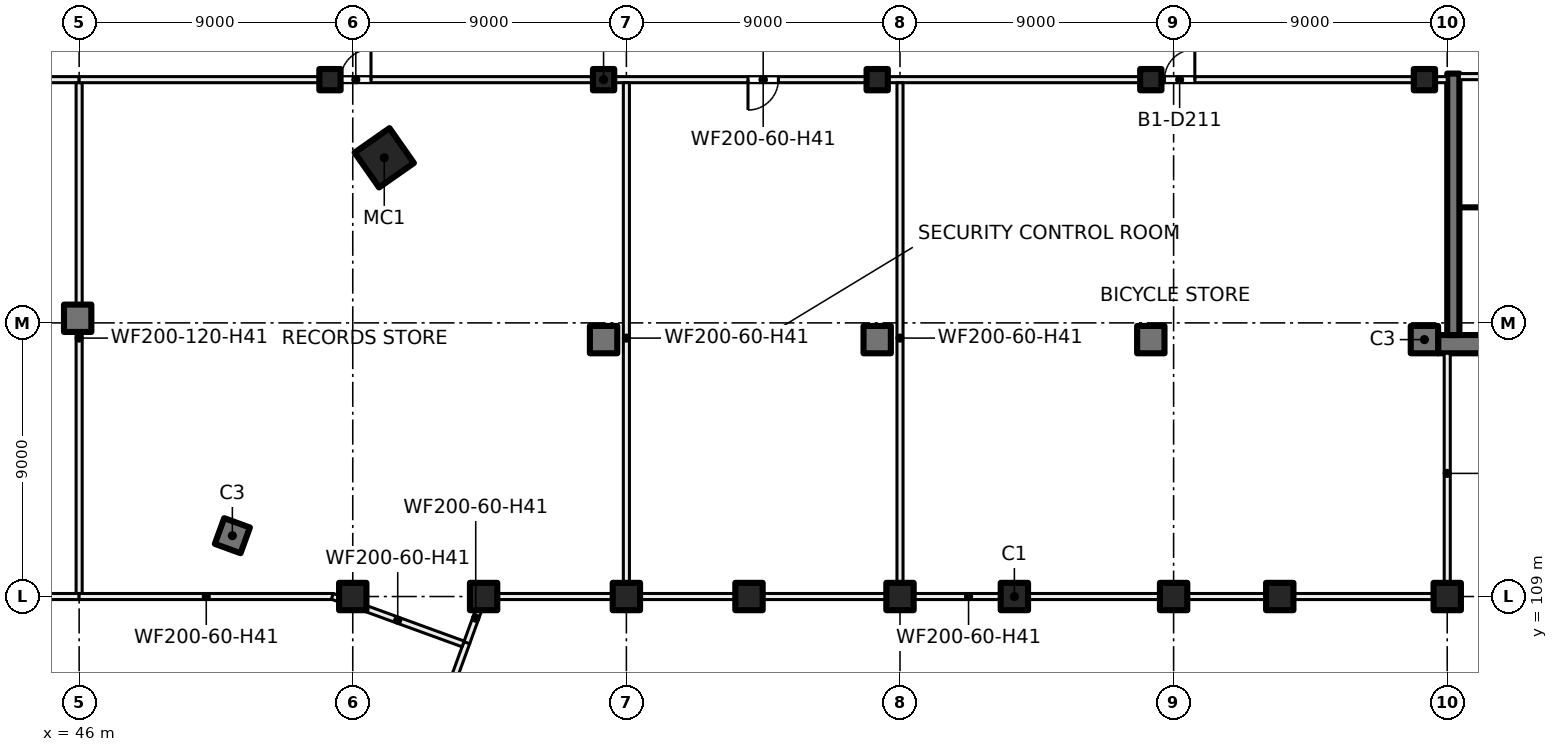
"""IFC4 building model, lengths in metres.
Left out: names, types, materials, properties, quantities, classifications, styles, units other than length and angle.
Written with IfcOpenShell. Run it as: python <this file> out.ifc"""

import sys

from ifc_helpers import new_model, si_unit, direction, frame, frame_2d, origin, origin_2d, place, context, subcontext, project, spatial, rectangle, hollow_rectangle, extrude, element, fill, save


model = new_model("IFC4")
c1 = context("Model", 3, precision=1e-05, world=origin(), true_north=direction((0.0, 1.0)))
c2 = subcontext(c1, "Body", "Model", "MODEL_VIEW")
j1 = project(units=[si_unit("LENGTHUNIT", "METRE"), si_unit("PLANEANGLEUNIT", "RADIAN")], contexts=[c1])
p1 = place(None, origin())
s1 = spatial("IfcSite", under=j1, at=p1, CompositionType="ELEMENT")
p2 = place(p1, origin())
s2 = spatial("IfcBuilding", under=s1, at=p2, CompositionType="ELEMENT")
p3 = place(p2, frame((0.0, 0.0, -4.5)))
s3 = spatial("IfcBuildingStorey", under=s2, at=p3, CompositionType="ELEMENT", Elevation=-4.5)
for number, where, z_axis, x_axis in (
    (1, (55.0, 109.0, 0.0), (0.0, 0.0, 1.0), (1.0, 0.0, 0.0)),
    (2, (64.0, 109.0, 0.0), (0.0, 0.0, 1.0), (1.0, 0.0, 0.0)),
    (3, (73.0, 109.0, 0.0), (0.0, 0.0, 1.0), (1.0, 0.0, 0.0)),
    (4, (82.0, 109.0, 0.0), (0.0, 0.0, 1.0), (1.0, 0.0, 0.0)),
    (5, (91.0, 109.0, 0.0), (0.0, 0.0, 1.0), (1.0, 0.0, 0.0)),
    (6, (59.304, 109.0, 0.0), (0.0, 0.0, 1.0), (1.0, 0.0, 0.0)),
    (7, (68.033, 109.0, 0.0), (0.0, 0.0, 1.0), (1.0, 0.0, 0.0)),
    (8, (76.762, 109.0, 0.0), (0.0, 0.0, 1.0), (1.0, 0.0, 0.0)),
    (9, (85.491, 109.0, 0.0), (0.0, 0.0, 1.0), (1.0, 0.0, 0.0)),
):
    element("IfcColumn", number, at=place(p3, frame(where, z_axis=z_axis, x_axis=x_axis)), inside=s3, PredefinedType="COLUMN", context=c2, shape_type="SweptSolid", body=[
        extrude(rectangle(XDim=0.9, YDim=0.9, at=origin_2d()), origin(), (0.0, 0.0, 1.0), 4.5),
    ])
p4 = place(p3, frame((56.036, 123.43, 0.0), z_axis=(0.0, 0.0, 1.0), x_axis=(0.573576436351, -0.819152044289, 0.0)))
e10 = element("IfcColumn", 10, at=p4, inside=s3, PredefinedType="COLUMN", context=c2, shape_type="SweptSolid", body=[
    extrude(hollow_rectangle(XDim=1.4, YDim=1.4, WallThickness=0.04, at=origin_2d()), origin(), (0.0, 0.0, 1.0), 4.5),
])
for number, where, z_axis, x_axis in (
    (11, (54.25, 126.0, 0.0), (0.0, 0.0, 1.0), (1.0, 0.0, 0.0)),
    (12, (63.25, 126.0, 0.0), (0.0, 0.0, 1.0), (1.0, 0.0, 0.0)),
    (13, (72.25, 126.0, 0.0), (0.0, 0.0, 1.0), (1.0, 0.0, 0.0)),
    (14, (81.25, 126.0, 0.0), (0.0, 0.0, 1.0), (1.0, 0.0, 0.0)),
    (15, (90.25, 126.0, 0.0), (0.0, 0.0, 1.0), (1.0, 0.0, 0.0)),
):
    element("IfcColumn", number, at=place(p3, frame(where, z_axis=z_axis, x_axis=x_axis)), inside=s3, PredefinedType="COLUMN", context=c2, shape_type="SweptSolid", body=[
        extrude(rectangle(XDim=0.7, YDim=0.7, at=origin_2d()), origin(), (0.0, 0.0, 1.0), 4.5),
    ])
for number, where, z_axis, x_axis in (
    (16, (45.952, 118.152, 0.0), (0.0, 0.0, 1.0), (1.0, 0.0, 0.0)),
    (17, (63.25, 117.45, 0.0), (0.0, 0.0, 1.0), (1.0, 0.0, 0.0)),
    (18, (72.25, 117.45, 0.0), (0.0, 0.0, 1.0), (1.0, 0.0, 0.0)),
    (19, (81.25, 117.45, 0.0), (0.0, 0.0, 1.0), (1.0, 0.0, 0.0)),
    (20, (90.25, 117.45, 0.0), (0.0, 0.0, 1.0), (1.0, 0.0, 0.0)),
    (21, (51.04, 111.001, 0.0), (0.0, 0.0, 1.0), (-0.342, -0.94, 0.0)),
):
    element("IfcColumn", number, at=place(p3, frame(where, z_axis=z_axis, x_axis=x_axis)), inside=s3, PredefinedType="COLUMN", context=c2, shape_type="SweptSolid", body=[
        extrude(rectangle(XDim=0.9, YDim=0.9, at=origin_2d()), origin(), (0.0, 0.0, 1.0), 4.5),
    ])
p5 = place(p3, frame((99.6, 117.3, 0.0), z_axis=(0.0, 0.0, 1.0), x_axis=(-1.0, 0.0, 0.0)))
e22 = element("IfcWall", 22, at=p5, inside=s3, PredefinedType="SHEAR", context=c2, shape_type="SweptSolid", body=[
    extrude(rectangle(XDim=8.9, YDim=0.6, at=frame_2d((4.45, 0.0))), origin(), (0.0, 0.0, 1.0), 4.5),
])
p6 = place(p3, frame((91.2, 126.2, 0.0), z_axis=(0.0, 0.0, 1.0), x_axis=(0.0, -1.0, 0.0)))
e23 = element("IfcWall", 23, at=p6, inside=s3, PredefinedType="SHEAR", context=c2, shape_type="SweptSolid", body=[
    extrude(rectangle(XDim=8.6, YDim=0.4, at=frame_2d((4.3, 0.0))), origin(), (0.0, 0.0, 1.0), 4.5),
])
p7 = place(p3, frame((95.2, 126.1, 0.0), z_axis=(0.0, 0.0, 1.0), x_axis=(-1.0, 0.0, 0.0)))
e24 = element("IfcWall", 24, at=p7, inside=s3, PredefinedType="PARTITIONING", context=c2, shape_type="SweptSolid", body=[
    extrude(rectangle(XDim=3.8, YDim=0.2, at=frame_2d((1.9, 0.0))), origin(), (0.0, 0.0, 1.0), 4.1),
])
p8 = place(p7, frame((0.3, 0.0, 0.0)))
e25 = element("IfcOpeningElement", 25, at=p8, cuts=e24, PredefinedType="OPENING", context=c2, shape_type="SweptSolid", body=[
    extrude(rectangle(XDim=1.2, YDim=2.1, at=frame_2d((0.6, 1.05))), frame((0.0, 0.11, 0.0), z_axis=(0.0, -1.0, 0.0), x_axis=(1.0, 0.0, 0.0)), (0.0, 0.0, 1.0), 0.22),
])
p9 = place(p3, frame((93.35, 121.8, 0.0), z_axis=(0.0, 0.0, 1.0), x_axis=(-1.0, 0.0, 0.0)))
e26 = element("IfcWall", 26, at=p9, inside=s3, PredefinedType="PARTITIONING", context=c2, shape_type="SweptSolid", body=[
    extrude(rectangle(XDim=1.95, YDim=0.1, at=frame_2d((0.975, 0.0))), origin(), (0.0, 0.0, 1.0), 4.1),
])
p10 = place(p3, frame((46.0, 126.0, 0.0), z_axis=(0.0, 0.0, 1.0), x_axis=(-1.0, 0.0, 0.0)))
e27 = element("IfcWall", 27, at=p10, inside=s3, PredefinedType="PARTITIONING", context=c2, shape_type="SweptSolid", body=[
    extrude(rectangle(XDim=17.9, YDim=0.2, at=frame_2d((8.95, 0.0))), origin(), (0.0, 0.0, 1.0), 4.1),
])
p11 = place(p10, frame((5.498, 0.0, 0.0)))
e28 = element("IfcOpeningElement", 28, at=p11, cuts=e27, PredefinedType="OPENING", context=c2, shape_type="SweptSolid", body=[
    extrude(rectangle(XDim=1.0, YDim=2.1, at=frame_2d((0.5, 1.05))), frame((0.0, 0.11, 0.0), z_axis=(0.0, -1.0, 0.0), x_axis=(1.0, 0.0, 0.0)), (0.0, 0.0, 1.0), 0.22),
])
p12 = place(p3, frame((37.062, 109.0, 0.0), z_axis=(0.0, 0.0, 1.0), x_axis=(1.0, 0.0, 0.0)))
e29 = element("IfcWall", 29, at=p12, inside=s3, PredefinedType="PARTITIONING", context=c2, shape_type="SweptSolid", body=[
    extrude(rectangle(XDim=8.938, YDim=0.2, at=frame_2d((4.469, 0.0))), origin(), (0.0, 0.0, 1.0), 4.1),
])
p13 = place(p3, frame((46.0, 109.1, 0.0), z_axis=(0.0, 0.0, 1.0), x_axis=(0.0, 1.0, 0.0)))
e30 = element("IfcWall", 30, at=p13, inside=s3, PredefinedType="PARTITIONING", context=c2, shape_type="SweptSolid", body=[
    extrude(rectangle(XDim=16.8, YDim=0.2, at=frame_2d((8.4, 0.0))), origin(), (0.0, 0.0, 1.0), 4.1),
])
p14 = place(p3, frame((46.0, 109.0, 0.0), z_axis=(0.0, 0.0, 1.0), x_axis=(1.0, 0.0, 0.0)))
e31 = element("IfcWall", 31, at=p14, inside=s3, PredefinedType="PARTITIONING", context=c2, shape_type="SweptSolid", body=[
    extrude(rectangle(XDim=8.363, YDim=0.2, at=frame_2d((4.182, 0.0))), origin(), (0.0, 0.0, 1.0), 4.1),
])
p15 = place(p3, frame((91.0, 126.0, 0.0), z_axis=(0.0, 0.0, 1.0), x_axis=(-1.0, 0.0, 0.0)))
e32 = element("IfcWall", 32, at=p15, inside=s3, PredefinedType="PARTITIONING", context=c2, shape_type="SweptSolid", body=[
    extrude(rectangle(XDim=45.0, YDim=0.2, at=frame_2d((22.5, 0.0))), origin(), (0.0, 0.0, 1.0), 4.1),
])
p16 = place(p15, frame((35.4, 0.0, 0.0)))
e33 = element("IfcOpeningElement", 33, at=p16, cuts=e32, PredefinedType="OPENING", context=c2, shape_type="SweptSolid", body=[
    extrude(rectangle(XDim=1.0, YDim=2.1, at=frame_2d((0.5, 1.05))), frame((0.0, 0.11, 0.0), z_axis=(0.0, -1.0, 0.0), x_axis=(1.0, 0.0, 0.0)), (0.0, 0.0, 1.0), 0.22),
])
p17 = place(p15, frame((22.0, 0.0, 0.0)))
e34 = element("IfcOpeningElement", 34, at=p17, cuts=e32, PredefinedType="OPENING", context=c2, shape_type="SweptSolid", body=[
    extrude(rectangle(XDim=1.0, YDim=2.1, at=frame_2d((0.5, 1.05))), frame((0.0, 0.11, 0.0), z_axis=(0.0, -1.0, 0.0), x_axis=(1.0, 0.0, 0.0)), (0.0, 0.0, 1.0), 0.22),
])
p18 = place(p15, frame((8.302, 0.0, 0.0)))
e35 = element("IfcOpeningElement", 35, at=p18, cuts=e32, PredefinedType="OPENING", context=c2, shape_type="SweptSolid", body=[
    extrude(rectangle(XDim=1.0, YDim=2.1, at=frame_2d((0.5, 1.05))), frame((0.0, 0.11, 0.0), z_axis=(0.0, -1.0, 0.0), x_axis=(1.0, 0.0, 0.0)), (0.0, 0.0, 1.0), 0.22),
])
p19 = place(p3, frame((54.0, 94.429, 0.0), z_axis=(0.0, 0.0, 1.0), x_axis=(0.342057301943, 0.939679095323, 0.0)))
e36 = element("IfcWall", 36, at=p19, inside=s3, PredefinedType="PARTITIONING", context=c2, shape_type="SweptSolid", body=[
    extrude(rectangle(XDim=13.91, YDim=0.2, at=frame_2d((6.955, 0.0))), origin(), (0.0, 0.0, 1.0), 4.1),
])
p20 = place(p3, frame((54.328, 109.006, 0.0), z_axis=(0.0, 0.0, 1.0), x_axis=(0.939667244136, -0.342089857053, 0.0)))
e37 = element("IfcWall", 37, at=p20, inside=s3, PredefinedType="PARTITIONING", context=c2, shape_type="SweptSolid", body=[
    extrude(rectangle(XDim=4.578, YDim=0.2, at=frame_2d((2.289, 0.0))), origin(), (0.0, 0.0, 1.0), 4.1),
])
p21 = place(p3, frame((58.751, 107.481, 0.0), z_axis=(0.0, 0.0, 1.0), x_axis=(0.341925778056, 0.93972696157, 0.0)))
e38 = element("IfcWall", 38, at=p21, inside=s3, PredefinedType="PARTITIONING", context=c2, shape_type="SweptSolid", body=[
    extrude(rectangle(XDim=1.717, YDim=0.2, at=frame_2d((0.858, 0.0))), origin(), (0.0, 0.0, 1.0), 4.1),
])
p22 = place(p3, frame((59.41, 109.0, 0.0), z_axis=(0.0, 0.0, 1.0), x_axis=(1.0, 0.0, 0.0)))
e39 = element("IfcWall", 39, at=p22, inside=s3, PredefinedType="PARTITIONING", context=c2, shape_type="SweptSolid", body=[
    extrude(rectangle(XDim=31.69, YDim=0.2, at=frame_2d((15.845, 0.0))), origin(), (0.0, 0.0, 1.0), 4.1),
])
for number, where, z_axis, x_axis in (
    (40, (64.0, 109.1, 0.0), (0.0, 0.0, 1.0), (0.0, 1.0, 0.0)),
    (41, (73.0, 109.1, 0.0), (0.0, 0.0, 1.0), (0.0, 1.0, 0.0)),
):
    element("IfcWall", number, at=place(p3, frame(where, z_axis=z_axis, x_axis=x_axis)), inside=s3, PredefinedType="PARTITIONING", context=c2, shape_type="SweptSolid", body=[
        extrude(rectangle(XDim=16.8, YDim=0.2, at=frame_2d((8.4, 0.0))), origin(), (0.0, 0.0, 1.0), 4.1),
    ])
p23 = place(p3, frame((91.0, 109.1, 0.0), z_axis=(0.0, 0.0, 1.0), x_axis=(0.0, 1.0, 0.0)))
e42 = element("IfcWall", 42, at=p23, inside=s3, PredefinedType="PARTITIONING", context=c2, shape_type="SweptSolid", body=[
    extrude(rectangle(XDim=7.9, YDim=0.2, at=frame_2d((3.95, 0.0))), origin(), (0.0, 0.0, 1.0), 4.1),
])
p24 = place(p16, origin())
e43 = element("IfcDoor", 43, at=p24, inside=s3, OperationType="SINGLE_SWING_LEFT", PredefinedType="DOOR", context=c2, shape_type="SweptSolid", body=[
    extrude(rectangle(XDim=1.0, YDim=2.1, at=frame_2d((0.5, 1.05))), frame((0.0, 0.025, 0.0), z_axis=(0.0, -1.0, 0.0), x_axis=(1.0, 0.0, 0.0)), (0.0, 0.0, 1.0), 0.05),
])
fill(e33, e43)
p25 = place(p17, origin())
e44 = element("IfcDoor", 44, at=p25, inside=s3, OperationType="SINGLE_SWING_RIGHT", PredefinedType="DOOR", context=c2, shape_type="SweptSolid", body=[
    extrude(rectangle(XDim=1.0, YDim=2.1, at=frame_2d((0.5, 1.05))), frame((0.0, 0.025, 0.0), z_axis=(0.0, -1.0, 0.0), x_axis=(1.0, 0.0, 0.0)), (0.0, 0.0, 1.0), 0.05),
])
fill(e34, e44)
p26 = place(p18, origin())
e45 = element("IfcDoor", 45, at=p26, inside=s3, OperationType="SINGLE_SWING_LEFT", PredefinedType="DOOR", context=c2, shape_type="SweptSolid", body=[
    extrude(rectangle(XDim=1.0, YDim=2.1, at=frame_2d((0.5, 1.05))), frame((0.0, 0.025, 0.0), z_axis=(0.0, -1.0, 0.0), x_axis=(1.0, 0.0, 0.0)), (0.0, 0.0, 1.0), 0.05),
])
fill(e35, e45)
save(model, sys.argv[1])
